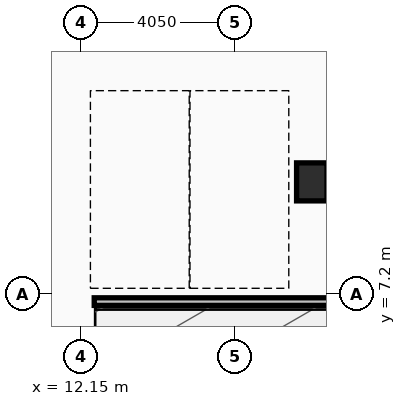
"""IFC4 building model, lengths in metres.
Left out: names, types, materials, properties, quantities, classifications, styles, units other than length and angle.
Written with IfcOpenShell. Run it as: python <this file> out.ifc"""

import sys

from ifc_helpers import new_model, si_unit, direction, frame, frame_2d, origin, origin_2d, place, context, subcontext, project, spatial, rectangle, hollow_rectangle, extrude, element, save


model = new_model("IFC4")
c1 = context("Model", 3, precision=1e-05, world=origin(), true_north=direction((0.0, 1.0)))
c2 = subcontext(c1, "Body", "Model", "MODEL_VIEW")
j1 = project(units=[si_unit("LENGTHUNIT", "METRE"), si_unit("PLANEANGLEUNIT", "RADIAN")], contexts=[c1])
p1 = place(None, origin())
s1 = spatial("IfcSite", under=j1, at=p1, CompositionType="ELEMENT")
p2 = place(p1, origin())
s2 = spatial("IfcBuilding", under=s1, at=p2, CompositionType="ELEMENT")
p3 = place(p2, frame((0.0, 0.0, -4.5)))
s3 = spatial("IfcBuildingStorey", under=s2, at=p3, CompositionType="ELEMENT", Elevation=-4.5)
p4 = place(p3, frame((18.225, 10.15, 0.0), z_axis=(0.0, 0.0, 1.0), x_axis=(1.0, 0.0, 0.0)))
e1 = element("IfcColumn", 1, at=p4, inside=s3, PredefinedType="COLUMN", context=c2, shape_type="SweptSolid", body=[
    extrude(hollow_rectangle(XDim=0.8, YDim=1.0, WallThickness=0.055, at=origin_2d()), origin(), (0.0, 0.0, 1.0), 4.5),
])
p5 = place(p3, frame((12.5, 7.0, 0.0), z_axis=(0.0, 0.0, 1.0), x_axis=(1.0, 0.0, 0.0)))
e2 = element("IfcWall", 2, at=p5, inside=s3, PredefinedType="PARTITIONING", context=c2, shape_type="SweptSolid", body=[
    extrude(rectangle(XDim=45.0, YDim=0.2, at=frame_2d((22.5, 0.0))), origin(), (0.0, 0.0, 1.0), 3.37),
])
save(model, sys.argv[1])
